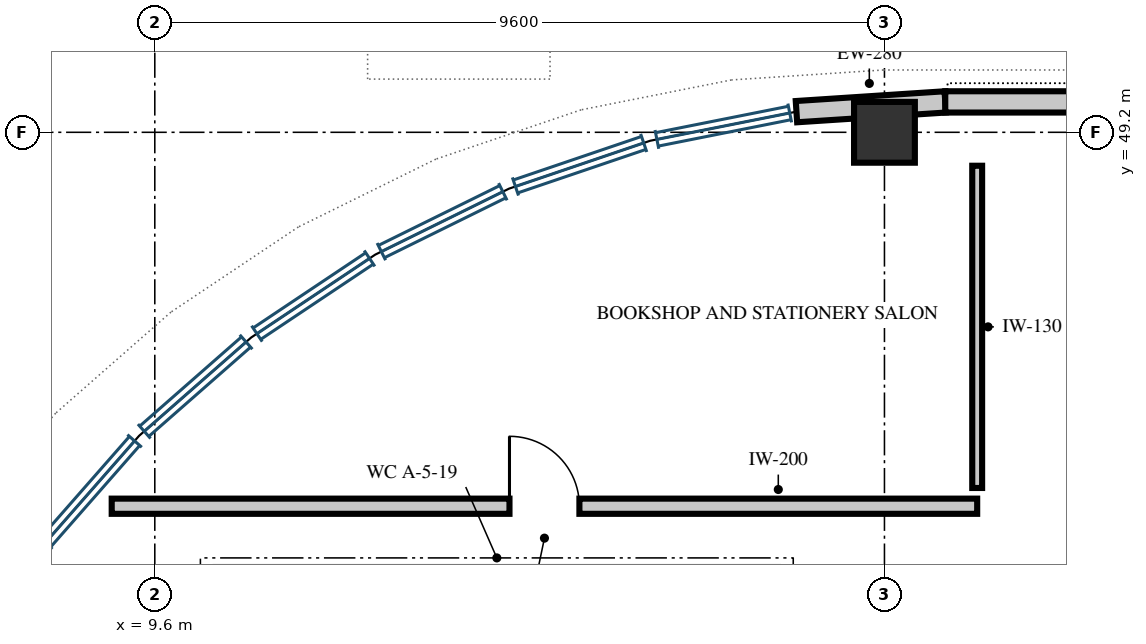
"""IFC4 building model, lengths in metres.
Left out: names, types, materials, properties, quantities, classifications, styles, units other than length and angle.
Written with IfcOpenShell. Run it as: python <this file> out.ifc"""

import sys

from ifc_helpers import new_model, si_unit, direction, frame, frame_2d, origin, origin_2d, place, context, subcontext, project, spatial, rectangle, extrude, element, fill, save


model = new_model("IFC4")
c1 = context("Model", 3, precision=1e-05, world=origin(), true_north=direction((0.0, 1.0)))
c2 = subcontext(c1, "Body", "Model", "MODEL_VIEW")
j1 = project(units=[si_unit("LENGTHUNIT", "METRE"), si_unit("PLANEANGLEUNIT", "RADIAN")], contexts=[c1])
p1 = place(None, origin())
s1 = spatial("IfcSite", under=j1, at=p1, CompositionType="ELEMENT")
p2 = place(p1, origin())
s2 = spatial("IfcBuilding", under=s1, at=p2, CompositionType="ELEMENT")
p3 = place(p2, frame((0.0, 0.0, 19.8)))
s3 = spatial("IfcBuildingStorey", under=s2, at=p3, CompositionType="ELEMENT", Elevation=19.8)
p4 = place(p3, frame((19.2, 49.2, 0.0), z_axis=(0.0, 0.0, 1.0), x_axis=(1.0, 0.0, 0.0)))
e1 = element("IfcColumn", 1, at=p4, inside=s3, PredefinedType="COLUMN", context=c2, shape_type="SweptSolid", body=[
    extrude(rectangle(XDim=0.8, YDim=0.8, at=origin_2d()), origin(), (0.0, 0.0, 1.0), 4.8),
])
p5 = place(p3, frame((18.042, 49.472, 0.0), z_axis=(0.0, 0.0, 1.0), x_axis=(0.997856149912, 0.065445428286, 0.0)))
e2 = element("IfcWall", 2, at=p5, inside=s3, PredefinedType="SOLIDWALL", context=c2, shape_type="SweptSolid", body=[
    extrude(rectangle(XDim=1.962, YDim=0.28, at=frame_2d((0.981, 0.0))), origin(), (0.0, 0.0, 1.0), 3.42),
])
p6 = place(p3, frame((20.0, 49.6, 0.0), z_axis=(0.0, 0.0, 1.0), x_axis=(1.0, 0.0, 0.0)))
e3 = element("IfcWall", 3, at=p6, inside=s3, PredefinedType="SOLIDWALL", context=c2, shape_type="SweptSolid", body=[
    extrude(rectangle(XDim=8.402, YDim=0.28, at=frame_2d((4.201, 0.0))), origin(), (0.0, 0.0, 1.0), 3.42),
])
p7 = place(p6, frame((5.5, 0.0, 1.1)))
e4 = element("IfcOpeningElement", 4, at=p7, cuts=e3, PredefinedType="OPENING", context=c2, shape_type="SweptSolid", body=[
    extrude(rectangle(XDim=1.9, YDim=1.85, at=frame_2d((0.95, 0.925))), frame((0.0, 0.152, 0.0), z_axis=(0.0, -1.0, 0.0), x_axis=(1.0, 0.0, 0.0)), (0.0, 0.0, 1.0), 0.304),
])
p8 = place(p3, frame((9.033, 44.28, 0.0), z_axis=(0.0, 0.0, 1.0), x_axis=(1.0, 0.0, 0.0)))
e5 = element("IfcWall", 5, at=p8, inside=s3, PredefinedType="PARTITIONING", context=c2, shape_type="SweptSolid", body=[
    extrude(rectangle(XDim=11.387, YDim=0.2, at=frame_2d((5.693, 0.0))), origin(), (0.0, 0.0, 1.0), 3.42),
])
p9 = place(p8, frame((5.233, 0.0, 0.0)))
e6 = element("IfcOpeningElement", 6, at=p9, cuts=e5, PredefinedType="OPENING", context=c2, shape_type="SweptSolid", body=[
    extrude(rectangle(XDim=0.92, YDim=2.1, at=frame_2d((0.46, 1.05))), frame((0.0, 0.112, 0.0), z_axis=(0.0, -1.0, 0.0), x_axis=(1.0, 0.0, 0.0)), (0.0, 0.0, 1.0), 0.224),
])
p10 = place(p3, frame((20.42, 48.76, 0.0), z_axis=(0.0, 0.0, 1.0), x_axis=(0.0, -1.0, 0.0)))
e7 = element("IfcWall", 7, at=p10, inside=s3, PredefinedType="PARTITIONING", context=c2, shape_type="SweptSolid", body=[
    extrude(rectangle(XDim=4.24, YDim=0.13, at=frame_2d((2.12, 0.0))), origin(), (0.0, 0.0, 1.0), 4.48),
])
p11 = place(p9, origin())
e8 = element("IfcDoor", 8, at=p11, inside=s3, OperationType="SINGLE_SWING_LEFT", PredefinedType="DOOR", context=c2, shape_type="SweptSolid", body=[
    extrude(rectangle(XDim=0.92, YDim=2.1, at=frame_2d((0.46, 1.05))), frame((0.0, 0.025, 0.0), z_axis=(0.0, -1.0, 0.0), x_axis=(1.0, 0.0, 0.0)), (0.0, 0.0, 1.0), 0.05),
])
fill(e6, e8)
save(model, sys.argv[1])
